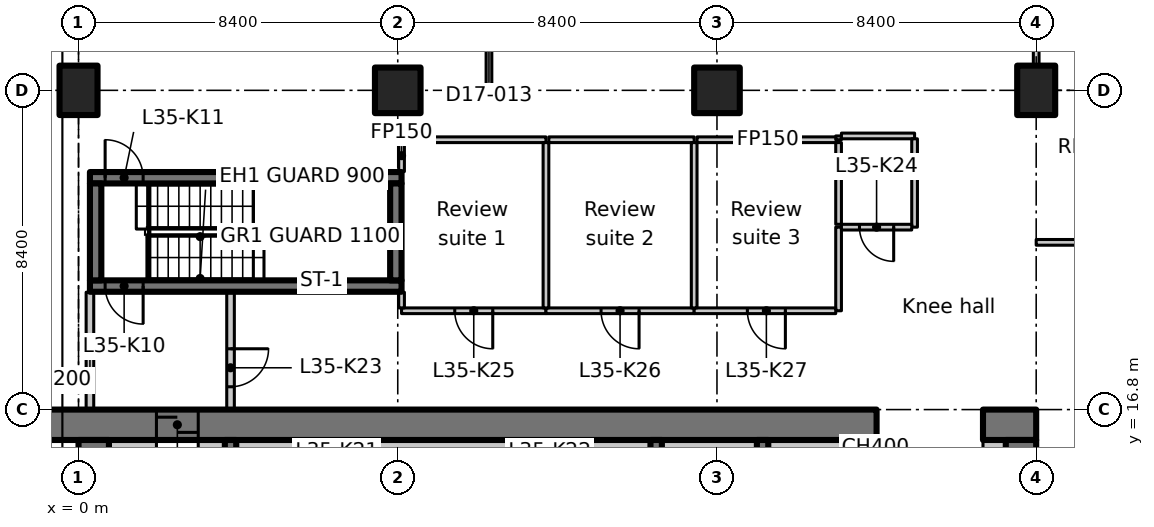
"""IFC4 building model, lengths in metres.
Left out: names, types, materials, properties, quantities, classifications, styles, units other than length and angle.
Written with IfcOpenShell. Run it as: python <this file> out.ifc"""

import sys

from ifc_helpers import new_model, si_unit, direction, frame, frame_2d, origin, origin_2d, place, context, subcontext, project, spatial, polyline, rectangle, outline, extrude, element, fill, save


model = new_model("IFC4")
c1 = context("Model", 3, precision=1e-05, world=origin(), true_north=direction((0.0, 1.0)))
c2 = subcontext(c1, "Body", "Model", "MODEL_VIEW")
j1 = project(units=[si_unit("LENGTHUNIT", "METRE"), si_unit("PLANEANGLEUNIT", "RADIAN")], contexts=[c1])
p1 = place(None, origin())
s1 = spatial("IfcSite", under=j1, at=p1, CompositionType="ELEMENT")
p2 = place(p1, origin())
s2 = spatial("IfcBuilding", under=s1, at=p2, CompositionType="ELEMENT")
p3 = place(p2, frame((0.0, 0.0, 142.1)))
s3 = spatial("IfcBuildingStorey", under=s2, at=p3, CompositionType="ELEMENT", Elevation=142.1)
p4 = place(p3, frame((0.0, 25.2, 0.0), z_axis=(0.0, 0.0, 1.0), x_axis=(1.0, 0.0, 0.0)))
e1 = element("IfcColumn", 1, at=p4, inside=s3, PredefinedType="COLUMN", context=c2, shape_type="SweptSolid", body=[
    extrude(rectangle(XDim=1.0, YDim=1.3, at=origin_2d()), origin(), (0.0, 0.0, 1.0), 3.35),
])
for number, where, z_axis, x_axis in (
    (2, (8.4, 25.2, 0.0), (0.0, 0.0, 1.0), (1.0, 0.0, 0.0)),
    (3, (16.8, 25.2, 0.0), (0.0, 0.0, 1.0), (1.0, 0.0, 0.0)),
):
    element("IfcColumn", number, at=place(p3, frame(where, z_axis=z_axis, x_axis=x_axis)), inside=s3, PredefinedType="COLUMN", context=c2, shape_type="SweptSolid", body=[
        extrude(rectangle(XDim=1.2, YDim=1.2, at=origin_2d()), origin(), (0.0, 0.0, 1.0), 3.35),
    ])
p5 = place(p3, frame((25.2, 25.2, 0.0), z_axis=(0.0, 0.0, 1.0), x_axis=(1.0, 0.0, 0.0)))
e4 = element("IfcColumn", 4, at=p5, inside=s3, PredefinedType="COLUMN", context=c2, shape_type="SweptSolid", body=[
    extrude(rectangle(XDim=1.0, YDim=1.3, at=origin_2d()), origin(), (0.0, 0.0, 1.0), 3.35),
])
p6 = place(p3, frame((-1.1, 16.4, 0.0), z_axis=(0.0, 0.0, 1.0), x_axis=(1.0, 0.0, 0.0)))
e5 = element("IfcWall", 5, at=p6, inside=s3, PredefinedType="SHEAR", context=c2, shape_type="SweptSolid", body=[
    extrude(rectangle(XDim=22.1, YDim=0.8, at=frame_2d((11.05, 0.0))), origin(), (0.0, 0.0, 1.0), 3.35),
])
p7 = place(p6, frame((3.15, 0.0, 0.0)))
e6 = element("IfcOpeningElement", 6, at=p7, cuts=e5, PredefinedType="OPENING", context=c2, shape_type="SweptSolid", body=[
    extrude(rectangle(XDim=1.1, YDim=2.3, at=frame_2d((0.55, 1.15))), frame((0.0, 0.41, 0.0), z_axis=(0.0, -1.0, 0.0), x_axis=(1.0, 0.0, 0.0)), (0.0, 0.0, 1.0), 0.82),
])
p8 = place(p3, frame((23.8, 16.4, 0.0), z_axis=(0.0, 0.0, 1.0), x_axis=(1.0, 0.0, 0.0)))
e7 = element("IfcWall", 7, at=p8, inside=s3, PredefinedType="SHEAR", context=c2, shape_type="SweptSolid", body=[
    extrude(rectangle(XDim=1.4, YDim=0.8, at=frame_2d((0.7, 0.0))), origin(), (0.0, 0.0, 1.0), 3.35),
])
p9 = place(p3, frame((0.4, 7.136, 0.0), z_axis=(0.0, 0.0, 1.0), x_axis=(0.0, 1.0, 0.0)))
e8 = element("IfcWall", 8, at=p9, inside=s3, PredefinedType="SHEAR", context=c2, shape_type="SweptSolid", body=[
    extrude(rectangle(XDim=8.864, YDim=0.8, at=frame_2d((4.432, 0.0))), origin(), (0.0, 0.0, 1.0), 3.35),
])
p10 = place(p3, frame((24.8, 12.6, 0.0), z_axis=(0.0, 0.0, 1.0), x_axis=(0.0, 1.0, 0.0)))
e9 = element("IfcWall", 9, at=p10, inside=s3, PredefinedType="SHEAR", context=c2, shape_type="SweptSolid", body=[
    extrude(rectangle(XDim=3.4, YDim=0.8, at=frame_2d((1.7, 0.0))), origin(), (0.0, 0.0, 1.0), 3.35),
])
p11 = place(p3, frame((0.8, 15.8, 0.0), z_axis=(0.0, 0.0, 1.0), x_axis=(1.0, 0.0, 0.0)))
e10 = element("IfcWall", 10, at=p11, inside=s3, PredefinedType="PARTITIONING", context=c2, shape_type="SweptSolid", body=[
    extrude(rectangle(XDim=1.25, YDim=0.4, at=frame_2d((0.625, 0.0))), origin(), (0.0, 0.0, 1.0), 3.35),
])
p12 = place(p3, frame((23.8, 15.8, 0.0), z_axis=(0.0, 0.0, 1.0), x_axis=(1.0, 0.0, 0.0)))
e11 = element("IfcWall", 11, at=p12, inside=s3, PredefinedType="PARTITIONING", context=c2, shape_type="SweptSolid", body=[
    extrude(rectangle(XDim=0.6, YDim=0.4, at=frame_2d((0.3, 0.0))), origin(), (0.0, 0.0, 1.0), 3.35),
])
for number, where, z_axis, x_axis in (
    (12, (4.0, 12.95, 0.0), (0.0, 0.0, 1.0), (0.0, 1.0, 0.0)),
    (13, (15.2, 12.95, 0.0), (0.0, 0.0, 1.0), (0.0, 1.0, 0.0)),
    (14, (18.0, 12.95, 0.0), (0.0, 0.0, 1.0), (0.0, 1.0, 0.0)),
    (15, (20.8, 12.95, 0.0), (0.0, 0.0, 1.0), (0.0, 1.0, 0.0)),
):
    element("IfcWall", number, at=place(p3, frame(where, z_axis=z_axis, x_axis=x_axis)), inside=s3, PredefinedType="SHEAR", context=c2, shape_type="SweptSolid", body=[
        extrude(rectangle(XDim=3.05, YDim=0.3, at=frame_2d((1.525, 0.0))), origin(), (0.0, 0.0, 1.0), 3.35),
    ])
p13 = place(p3, frame((8.5, 20.05, 0.0), z_axis=(0.0, 0.0, 1.0), x_axis=(-1.0, 0.0, 0.0)))
e16 = element("IfcWall", 16, at=p13, inside=s3, PredefinedType="SHEAR", context=c2, shape_type="SweptSolid", body=[
    extrude(rectangle(XDim=8.2, YDim=0.3, at=frame_2d((4.1, 0.0))), origin(), (0.0, 0.0, 1.0), 3.35),
])
p14 = place(p13, frame((6.8, 0.0, 0.0)))
e17 = element("IfcOpeningElement", 17, at=p14, cuts=e16, PredefinedType="OPENING", context=c2, shape_type="SweptSolid", body=[
    extrude(rectangle(XDim=1.0, YDim=2.1, at=frame_2d((0.5, 1.05))), frame((0.0, 0.16, 0.0), z_axis=(0.0, -1.0, 0.0), x_axis=(1.0, 0.0, 0.0)), (0.0, 0.0, 1.0), 0.32),
])
p15 = place(p3, frame((0.3, 22.9, 0.0), z_axis=(0.0, 0.0, 1.0), x_axis=(1.0, 0.0, 0.0)))
e18 = element("IfcWall", 18, at=p15, inside=s3, PredefinedType="SHEAR", context=c2, shape_type="SweptSolid", body=[
    extrude(rectangle(XDim=8.2, YDim=0.3, at=frame_2d((4.1, 0.0))), origin(), (0.0, 0.0, 1.0), 3.35),
])
p16 = place(p15, frame((0.4, 0.0, 0.0)))
e19 = element("IfcOpeningElement", 19, at=p16, cuts=e18, PredefinedType="OPENING", context=c2, shape_type="SweptSolid", body=[
    extrude(rectangle(XDim=1.0, YDim=2.1, at=frame_2d((0.5, 1.05))), frame((0.0, 0.16, 0.0), z_axis=(0.0, -1.0, 0.0), x_axis=(1.0, 0.0, 0.0)), (0.0, 0.0, 1.0), 0.32),
])
for number, where, z_axis, x_axis in (
    (20, (0.45, 20.2, 0.0), (0.0, 0.0, 1.0), (0.0, 1.0, 0.0)),
    (21, (8.35, 20.2, 0.0), (0.0, 0.0, 1.0), (0.0, 1.0, 0.0)),
):
    element("IfcWall", number, at=place(p3, frame(where, z_axis=z_axis, x_axis=x_axis)), inside=s3, PredefinedType="SHEAR", context=c2, shape_type="SweptSolid", body=[
        extrude(rectangle(XDim=2.55, YDim=0.3, at=frame_2d((1.275, 0.0))), origin(), (0.0, 0.0, 1.0), 3.35),
    ])
p17 = place(p3, frame((0.3, 16.812, 0.0), z_axis=(0.0, 0.0, 1.0), x_axis=(0.0, 1.0, 0.0)))
e22 = element("IfcWall", 22, at=p17, inside=s3, PredefinedType="PARTITIONING", context=c2, shape_type="SweptSolid", body=[
    extrude(rectangle(XDim=3.076, YDim=0.2, at=frame_2d((1.538, 0.0))), origin(), (0.0, 0.0, 1.0), 2.98),
])
p18 = place(p3, frame((4.0, 19.888, 0.0), z_axis=(0.0, 0.0, 1.0), x_axis=(0.0, -1.0, 0.0)))
e23 = element("IfcWall", 23, at=p18, inside=s3, PredefinedType="PARTITIONING", context=c2, shape_type="SweptSolid", body=[
    extrude(rectangle(XDim=3.076, YDim=0.2, at=frame_2d((1.538, 0.0))), origin(), (0.0, 0.0, 1.0), 3.35),
])
p19 = place(p18, frame((1.488, 0.0, 0.0)))
e24 = element("IfcOpeningElement", 24, at=p19, cuts=e23, PredefinedType="OPENING", context=c2, shape_type="SweptSolid", body=[
    extrude(rectangle(XDim=1.0, YDim=2.1, at=frame_2d((0.5, 1.05))), frame((0.0, 0.11, 0.0), z_axis=(0.0, -1.0, 0.0), x_axis=(1.0, 0.0, 0.0)), (0.0, 0.0, 1.0), 0.22),
])
p20 = place(p3, frame((12.3, 19.4, 0.0), z_axis=(0.0, 0.0, 1.0), x_axis=(-1.0, 0.0, 0.0)))
e25 = element("IfcWall", 25, at=p20, inside=s3, PredefinedType="PARTITIONING", context=c2, shape_type="SweptSolid", body=[
    extrude(rectangle(XDim=3.8, YDim=0.15, at=frame_2d((1.9, 0.0))), origin(), (0.0, 0.0, 1.0), 3.35),
])
p21 = place(p20, frame((1.4, 0.0, 0.0)))
e26 = element("IfcOpeningElement", 26, at=p21, cuts=e25, PredefinedType="OPENING", context=c2, shape_type="SweptSolid", body=[
    extrude(rectangle(XDim=1.0, YDim=2.1, at=frame_2d((0.5, 1.05))), frame((0.0, 0.085, 0.0), z_axis=(0.0, -1.0, 0.0), x_axis=(1.0, 0.0, 0.0)), (0.0, 0.0, 1.0), 0.17),
])
p22 = place(p3, frame((8.5, 19.475, 0.0), z_axis=(0.0, 0.0, 1.0), x_axis=(0.0, 1.0, 0.0)))
e27 = element("IfcWall", 27, at=p22, inside=s3, PredefinedType="PARTITIONING", context=c2, shape_type="SweptSolid", body=[
    extrude(rectangle(XDim=0.413, YDim=0.15, at=frame_2d((0.207, 0.0))), origin(), (0.0, 0.0, 1.0), 3.35),
])
p23 = place(p3, frame((8.5, 23.062, 0.0), z_axis=(0.0, 0.0, 1.0), x_axis=(0.0, 1.0, 0.0)))
e28 = element("IfcWall", 28, at=p23, inside=s3, PredefinedType="PARTITIONING", context=c2, shape_type="SweptSolid", body=[
    extrude(rectangle(XDim=0.838, YDim=0.15, at=frame_2d((0.419, 0.0))), origin(), (0.0, 0.0, 1.0), 3.35),
])
p24 = place(p3, frame((8.575, 23.9, 0.0), z_axis=(0.0, 0.0, 1.0), x_axis=(1.0, 0.0, 0.0)))
e29 = element("IfcWall", 29, at=p24, inside=s3, PredefinedType="PARTITIONING", context=c2, shape_type="SweptSolid", body=[
    extrude(rectangle(XDim=3.725, YDim=0.15, at=frame_2d((1.863, 0.0))), origin(), (0.0, 0.0, 1.0), 3.35),
])
p25 = place(p3, frame((16.2, 19.4, 0.0), z_axis=(0.0, 0.0, 1.0), x_axis=(-1.0, 0.0, 0.0)))
e30 = element("IfcWall", 30, at=p25, inside=s3, PredefinedType="PARTITIONING", context=c2, shape_type="SweptSolid", body=[
    extrude(rectangle(XDim=3.9, YDim=0.15, at=frame_2d((1.95, 0.0))), origin(), (0.0, 0.0, 1.0), 3.35),
])
p26 = place(p25, frame((1.45, 0.0, 0.0)))
e31 = element("IfcOpeningElement", 31, at=p26, cuts=e30, PredefinedType="OPENING", context=c2, shape_type="SweptSolid", body=[
    extrude(rectangle(XDim=1.0, YDim=2.1, at=frame_2d((0.5, 1.05))), frame((0.0, 0.085, 0.0), z_axis=(0.0, -1.0, 0.0), x_axis=(1.0, 0.0, 0.0)), (0.0, 0.0, 1.0), 0.17),
])
p27 = place(p3, frame((12.3, 23.825, 0.0), z_axis=(0.0, 0.0, 1.0), x_axis=(0.0, -1.0, 0.0)))
e32 = element("IfcWall", 32, at=p27, inside=s3, PredefinedType="PARTITIONING", context=c2, shape_type="SweptSolid", body=[
    extrude(rectangle(XDim=4.35, YDim=0.15, at=frame_2d((2.175, 0.0))), origin(), (0.0, 0.0, 1.0), 3.35),
])
p28 = place(p3, frame((12.375, 23.9, 0.0), z_axis=(0.0, 0.0, 1.0), x_axis=(1.0, 0.0, 0.0)))
e33 = element("IfcWall", 33, at=p28, inside=s3, PredefinedType="PARTITIONING", context=c2, shape_type="SweptSolid", body=[
    extrude(rectangle(XDim=3.825, YDim=0.15, at=frame_2d((1.913, 0.0))), origin(), (0.0, 0.0, 1.0), 3.35),
])
p29 = place(p3, frame((20.0, 21.6, 0.0), z_axis=(0.0, 0.0, 1.0), x_axis=(0.0, -1.0, 0.0)))
e34 = element("IfcWall", 34, at=p29, inside=s3, PredefinedType="PARTITIONING", context=c2, shape_type="SweptSolid", body=[
    extrude(rectangle(XDim=2.2, YDim=0.15, at=frame_2d((1.1, 0.0))), origin(), (0.0, 0.0, 1.0), 3.35),
])
p30 = place(p3, frame((19.925, 19.4, 0.0), z_axis=(0.0, 0.0, 1.0), x_axis=(-1.0, 0.0, 0.0)))
e35 = element("IfcWall", 35, at=p30, inside=s3, PredefinedType="PARTITIONING", context=c2, shape_type="SweptSolid", body=[
    extrude(rectangle(XDim=3.725, YDim=0.15, at=frame_2d((1.863, 0.0))), origin(), (0.0, 0.0, 1.0), 3.35),
])
p31 = place(p30, frame((1.325, 0.0, 0.0)))
e36 = element("IfcOpeningElement", 36, at=p31, cuts=e35, PredefinedType="OPENING", context=c2, shape_type="SweptSolid", body=[
    extrude(rectangle(XDim=1.0, YDim=2.1, at=frame_2d((0.5, 1.05))), frame((0.0, 0.085, 0.0), z_axis=(0.0, -1.0, 0.0), x_axis=(1.0, 0.0, 0.0)), (0.0, 0.0, 1.0), 0.17),
])
p32 = place(p3, frame((16.2, 23.825, 0.0), z_axis=(0.0, 0.0, 1.0), x_axis=(0.0, -1.0, 0.0)))
e37 = element("IfcWall", 37, at=p32, inside=s3, PredefinedType="PARTITIONING", context=c2, shape_type="SweptSolid", body=[
    extrude(rectangle(XDim=4.35, YDim=0.15, at=frame_2d((2.175, 0.0))), origin(), (0.0, 0.0, 1.0), 3.35),
])
p33 = place(p3, frame((16.275, 23.9, 0.0), z_axis=(0.0, 0.0, 1.0), x_axis=(1.0, 0.0, 0.0)))
e38 = element("IfcWall", 38, at=p33, inside=s3, PredefinedType="PARTITIONING", context=c2, shape_type="SweptSolid", body=[
    extrude(rectangle(XDim=3.725, YDim=0.15, at=frame_2d((1.863, 0.0))), origin(), (0.0, 0.0, 1.0), 3.35),
])
p34 = place(p3, frame((20.0, 23.9, 0.0), z_axis=(0.0, 0.0, 1.0), x_axis=(0.0, 1.0, 0.0)))
e39 = element("IfcWall", 39, at=p34, inside=s3, PredefinedType="PARTITIONING", context=c2, shape_type="SweptSolid", body=[
    extrude(rectangle(XDim=0.1, YDim=0.15, at=frame_2d((0.05, 0.0))), origin(), (0.0, 0.0, 1.0), 3.35),
])
p35 = place(p3, frame((20.075, 24.0, 0.0), z_axis=(0.0, 0.0, 1.0), x_axis=(1.0, 0.0, 0.0)))
e40 = element("IfcWall", 40, at=p35, inside=s3, PredefinedType="PARTITIONING", context=c2, shape_type="SweptSolid", body=[
    extrude(rectangle(XDim=1.925, YDim=0.15, at=frame_2d((0.962, 0.0))), origin(), (0.0, 0.0, 1.0), 3.35),
])
p36 = place(p3, frame((22.0, 23.925, 0.0), z_axis=(0.0, 0.0, 1.0), x_axis=(0.0, -1.0, 0.0)))
e41 = element("IfcWall", 41, at=p36, inside=s3, PredefinedType="PARTITIONING", context=c2, shape_type="SweptSolid", body=[
    extrude(rectangle(XDim=2.325, YDim=0.15, at=frame_2d((1.163, 0.0))), origin(), (0.0, 0.0, 1.0), 3.35),
])
p37 = place(p3, frame((21.925, 21.6, 0.0), z_axis=(0.0, 0.0, 1.0), x_axis=(-1.0, 0.0, 0.0)))
e42 = element("IfcWall", 42, at=p37, inside=s3, PredefinedType="PARTITIONING", context=c2, shape_type="SweptSolid", body=[
    extrude(rectangle(XDim=1.85, YDim=0.15, at=frame_2d((0.925, 0.0))), origin(), (0.0, 0.0, 1.0), 3.35),
])
p38 = place(p37, frame((0.475, 0.0, 0.0)))
e43 = element("IfcOpeningElement", 43, at=p38, cuts=e42, PredefinedType="OPENING", context=c2, shape_type="SweptSolid", body=[
    extrude(rectangle(XDim=0.9, YDim=2.1, at=frame_2d((0.45, 1.05))), frame((0.0, 0.085, 0.0), z_axis=(0.0, -1.0, 0.0), x_axis=(1.0, 0.0, 0.0)), (0.0, 0.0, 1.0), 0.17),
])
p39 = place(p3, frame((20.0, 21.675, 0.0), z_axis=(0.0, 0.0, 1.0), x_axis=(0.0, 1.0, 0.0)))
e44 = element("IfcWall", 44, at=p39, inside=s3, PredefinedType="PARTITIONING", context=c2, shape_type="SweptSolid", body=[
    extrude(rectangle(XDim=2.15, YDim=0.15, at=frame_2d((1.075, 0.0))), origin(), (0.0, 0.0, 1.0), 3.35),
])
p40 = place(p3, frame((3.15, 15.8, 0.0), z_axis=(0.0, 0.0, 1.0), x_axis=(1.0, 0.0, 0.0)))
e45 = element("IfcWall", 45, at=p40, inside=s3, PredefinedType="PARTITIONING", context=c2, shape_type="SweptSolid", body=[
    extrude(rectangle(XDim=0.7, YDim=0.4, at=frame_2d((0.35, 0.0))), origin(), (0.0, 0.0, 1.0), 3.35),
])
p41 = place(p3, frame((4.15, 15.8, 0.0), z_axis=(0.0, 0.0, 1.0), x_axis=(1.0, 0.0, 0.0)))
e46 = element("IfcWall", 46, at=p41, inside=s3, PredefinedType="PARTITIONING", context=c2, shape_type="SweptSolid", body=[
    extrude(rectangle(XDim=10.9, YDim=0.4, at=frame_2d((5.45, 0.0))), origin(), (0.0, 0.0, 1.0), 3.35),
])
for number, where, z_axis, x_axis in (
    (47, (15.35, 15.8, 0.0), (0.0, 0.0, 1.0), (1.0, 0.0, 0.0)),
    (48, (18.15, 15.8, 0.0), (0.0, 0.0, 1.0), (1.0, 0.0, 0.0)),
):
    element("IfcWall", number, at=place(p3, frame(where, z_axis=z_axis, x_axis=x_axis)), inside=s3, PredefinedType="PARTITIONING", context=c2, shape_type="SweptSolid", body=[
        extrude(rectangle(XDim=2.5, YDim=0.4, at=frame_2d((1.25, 0.0))), origin(), (0.0, 0.0, 1.0), 3.35),
    ])
p42 = place(p3, frame((20.95, 15.8, 0.0), z_axis=(0.0, 0.0, 1.0), x_axis=(1.0, 0.0, 0.0)))
e49 = element("IfcWall", 49, at=p42, inside=s3, PredefinedType="PARTITIONING", context=c2, shape_type="SweptSolid", body=[
    extrude(rectangle(XDim=0.05, YDim=0.4, at=frame_2d((0.025, 0.0))), origin(), (0.0, 0.0, 1.0), 3.35),
])
p43 = place(p3, frame((25.2, 21.2, 0.0), z_axis=(0.0, 0.0, 1.0), x_axis=(1.0, 0.0, 0.0)))
e50 = element("IfcWall", 50, at=p43, inside=s3, PredefinedType="PARTITIONING", context=c2, shape_type="SweptSolid", body=[
    extrude(rectangle(XDim=4.2, YDim=0.15, at=frame_2d((2.1, 0.0))), origin(), (0.0, 0.0, 1.0), 3.33),
])
p44 = place(p3, frame((25.2, 31.0, 0.0), z_axis=(0.0, 0.0, 1.0), x_axis=(0.0, -1.0, 0.0)))
e51 = element("IfcWall", 51, at=p44, inside=s3, PredefinedType="PARTITIONING", context=c2, shape_type="SweptSolid", body=[
    extrude(outline(polyline([(0.0, 0.0), (5.13, 0.0), (5.13, 2.98), (0.0, 2.98), (0.0, 0.0)])), frame((0.0, 0.075, 0.0), z_axis=(0.0, -1.0, 0.0), x_axis=(1.0, 0.0, 0.0)), (0.0, 0.0, 1.0), 0.15),
])
p45 = place(p44, frame((1.93, 0.0, 0.0)))
e52 = element("IfcOpeningElement", 52, at=p45, cuts=e51, PredefinedType="OPENING", context=c2, shape_type="SweptSolid", body=[
    extrude(rectangle(XDim=1.1, YDim=2.1, at=frame_2d((0.55, 1.05))), frame((0.0, 0.085, 0.0), z_axis=(0.0, -1.0, 0.0), x_axis=(1.0, 0.0, 0.0)), (0.0, 0.0, 1.0), 0.17),
])
p46 = place(p3, frame((10.8, 25.2, 0.0), z_axis=(0.0, 0.0, 1.0), x_axis=(0.0, 1.0, 0.0)))
e53 = element("IfcWall", 53, at=p46, inside=s3, PredefinedType="PARTITIONING", context=c2, shape_type="SweptSolid", body=[
    extrude(rectangle(XDim=4.2, YDim=0.15, at=frame_2d((2.1, 0.0))), origin(), (0.0, 0.0, 1.0), 3.33),
])
p47 = place(p46, frame((1.5, 0.0, 0.0)))
e54 = element("IfcOpeningElement", 54, at=p47, cuts=e53, PredefinedType="OPENING", context=c2, shape_type="SweptSolid", body=[
    extrude(rectangle(XDim=1.1, YDim=2.1, at=frame_2d((0.55, 1.05))), frame((0.0, 0.085, 0.0), z_axis=(0.0, -1.0, 0.0), x_axis=(1.0, 0.0, 0.0)), (0.0, 0.0, 1.0), 0.17),
])
p48 = place(p7, origin())
e55 = element("IfcDoor", 55, at=p48, inside=s3, OperationType="SLIDING_TO_LEFT", PredefinedType="DOOR", context=c2, shape_type="SweptSolid", body=[
    extrude(rectangle(XDim=1.1, YDim=2.3, at=frame_2d((0.55, 1.15))), frame((0.0, 0.025, 0.0), z_axis=(0.0, -1.0, 0.0), x_axis=(1.0, 0.0, 0.0)), (0.0, 0.0, 1.0), 0.05),
])
fill(e6, e55)
p49 = place(p14, origin())
e56 = element("IfcDoor", 56, at=p49, inside=s3, OperationType="SINGLE_SWING_RIGHT", PredefinedType="DOOR", context=c2, shape_type="SweptSolid", body=[
    extrude(rectangle(XDim=1.0, YDim=2.1, at=frame_2d((0.5, 1.05))), frame((0.0, 0.025, 0.0), z_axis=(0.0, -1.0, 0.0), x_axis=(1.0, 0.0, 0.0)), (0.0, 0.0, 1.0), 0.05),
])
fill(e17, e56)
p50 = place(p16, origin())
e57 = element("IfcDoor", 57, at=p50, inside=s3, OperationType="SINGLE_SWING_LEFT", PredefinedType="DOOR", context=c2, shape_type="SweptSolid", body=[
    extrude(rectangle(XDim=1.0, YDim=2.1, at=frame_2d((0.5, 1.05))), frame((0.0, 0.025, 0.0), z_axis=(0.0, -1.0, 0.0), x_axis=(1.0, 0.0, 0.0)), (0.0, 0.0, 1.0), 0.05),
])
fill(e19, e57)
p51 = place(p19, origin())
e58 = element("IfcDoor", 58, at=p51, inside=s3, OperationType="SINGLE_SWING_LEFT", PredefinedType="DOOR", context=c2, shape_type="SweptSolid", body=[
    extrude(rectangle(XDim=1.0, YDim=2.1, at=frame_2d((0.5, 1.05))), frame((0.0, 0.025, 0.0), z_axis=(0.0, -1.0, 0.0), x_axis=(1.0, 0.0, 0.0)), (0.0, 0.0, 1.0), 0.05),
])
fill(e24, e58)
p52 = place(p38, origin())
e59 = element("IfcDoor", 59, at=p52, inside=s3, OperationType="SINGLE_SWING_RIGHT", PredefinedType="DOOR", context=c2, shape_type="SweptSolid", body=[
    extrude(rectangle(XDim=0.9, YDim=2.1, at=frame_2d((0.45, 1.05))), frame((0.0, 0.025, 0.0), z_axis=(0.0, -1.0, 0.0), x_axis=(1.0, 0.0, 0.0)), (0.0, 0.0, 1.0), 0.05),
])
fill(e43, e59)
p53 = place(p21, origin())
e60 = element("IfcDoor", 60, at=p53, inside=s3, OperationType="SINGLE_SWING_LEFT", PredefinedType="DOOR", context=c2, shape_type="SweptSolid", body=[
    extrude(rectangle(XDim=1.0, YDim=2.1, at=frame_2d((0.5, 1.05))), frame((0.0, 0.025, 0.0), z_axis=(0.0, -1.0, 0.0), x_axis=(1.0, 0.0, 0.0)), (0.0, 0.0, 1.0), 0.05),
])
fill(e26, e60)
p54 = place(p26, origin())
e61 = element("IfcDoor", 61, at=p54, inside=s3, OperationType="SINGLE_SWING_RIGHT", PredefinedType="DOOR", context=c2, shape_type="SweptSolid", body=[
    extrude(rectangle(XDim=1.0, YDim=2.1, at=frame_2d((0.5, 1.05))), frame((0.0, 0.025, 0.0), z_axis=(0.0, -1.0, 0.0), x_axis=(1.0, 0.0, 0.0)), (0.0, 0.0, 1.0), 0.05),
])
fill(e31, e61)
p55 = place(p31, origin())
e62 = element("IfcDoor", 62, at=p55, inside=s3, OperationType="SINGLE_SWING_LEFT", PredefinedType="DOOR", context=c2, shape_type="SweptSolid", body=[
    extrude(rectangle(XDim=1.0, YDim=2.1, at=frame_2d((0.5, 1.05))), frame((0.0, 0.025, 0.0), z_axis=(0.0, -1.0, 0.0), x_axis=(1.0, 0.0, 0.0)), (0.0, 0.0, 1.0), 0.05),
])
fill(e36, e62)
save(model, sys.argv[1])
